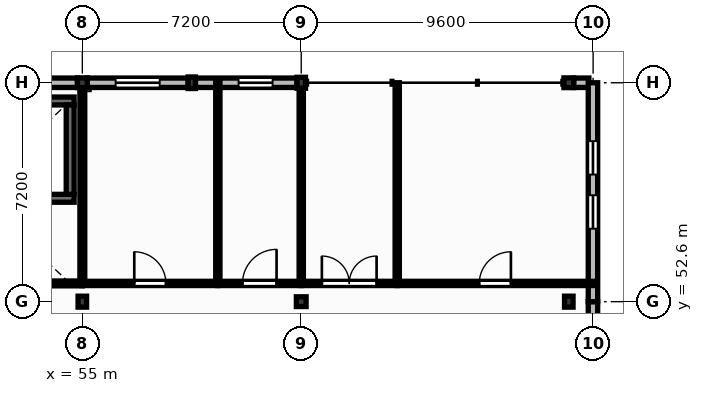
"""IFC4 building model, lengths in metres.
Left out: names, types, materials, properties, quantities, classifications, styles, units other than length and angle.
Written with IfcOpenShell. Run it as: python <this file> out.ifc"""

import sys

from ifc_helpers import new_model, si_unit, direction, frame, frame_2d, origin, origin_2d, place, context, subcontext, project, spatial, rectangle, extrude, element, fill, save


model = new_model("IFC4")
c1 = context("Model", 3, precision=1e-05, world=origin(), true_north=direction((0.0, 1.0)))
c2 = subcontext(c1, "Body", "Model", "MODEL_VIEW")
j1 = project(units=[si_unit("LENGTHUNIT", "METRE"), si_unit("PLANEANGLEUNIT", "RADIAN")], contexts=[c1])
p1 = place(None, origin())
s1 = spatial("IfcSite", under=j1, at=p1, CompositionType="ELEMENT")
p2 = place(p1, origin())
s2 = spatial("IfcBuilding", under=s1, at=p2, CompositionType="ELEMENT")
p3 = place(p2, frame((0.0, 0.0, 9.0)))
s3 = spatial("IfcBuildingStorey", under=s2, at=p3, CompositionType="ELEMENT", Elevation=9.0)
p4 = place(p3, frame((55.0, 52.6, 0.0), z_axis=(0.0, 0.0, 1.0), x_axis=(1.0, 0.0, 0.0)))
e1 = element("IfcColumn", 1, at=p4, inside=s3, PredefinedType="COLUMN", context=c2, shape_type="SweptSolid", body=[
    extrude(rectangle(XDim=0.28, YDim=0.36, at=origin_2d()), origin(), (0.0, 0.0, 1.0), 3.99),
])
p5 = place(p3, frame((55.0, 59.8, 0.0), z_axis=(0.0, 0.0, 1.0), x_axis=(1.0, 0.0, 0.0)))
e2 = element("IfcColumn", 2, at=p5, inside=s3, PredefinedType="COLUMN", context=c2, shape_type="SweptSolid", body=[
    extrude(rectangle(XDim=0.32, YDim=0.32, at=origin_2d()), origin(), (0.0, 0.0, 1.0), 3.99),
])
p6 = place(p3, frame((62.2, 52.6, 0.0), z_axis=(0.0, 0.0, 1.0), x_axis=(1.0, 0.0, 0.0)))
e3 = element("IfcColumn", 3, at=p6, inside=s3, PredefinedType="COLUMN", context=c2, shape_type="SweptSolid", body=[
    extrude(rectangle(XDim=0.32, YDim=0.32, at=origin_2d()), origin(), (0.0, 0.0, 1.0), 3.98),
])
for number, where, z_axis, x_axis in (
    (4, (62.2, 59.8, 0.0), (0.0, 0.0, 1.0), (1.0, 0.0, 0.0)),
    (5, (71.0, 52.6, 0.0), (0.0, 0.0, 1.0), (1.0, 0.0, 0.0)),
):
    element("IfcColumn", number, at=place(p3, frame(where, z_axis=z_axis, x_axis=x_axis)), inside=s3, PredefinedType="COLUMN", context=c2, shape_type="SweptSolid", body=[
        extrude(rectangle(XDim=0.28, YDim=0.36, at=origin_2d()), origin(), (0.0, 0.0, 1.0), 3.98),
    ])
p7 = place(p3, frame((71.0, 59.8, 0.0), z_axis=(0.0, 0.0, 1.0), x_axis=(1.0, 0.0, 0.0)))
e6 = element("IfcColumn", 6, at=p7, inside=s3, PredefinedType="COLUMN", context=c2, shape_type="SweptSolid", body=[
    extrude(rectangle(XDim=0.32, YDim=0.32, at=origin_2d()), origin(), (0.0, 0.0, 1.0), 3.98),
])
p8 = place(p3, frame((58.6, 59.8, 0.0), z_axis=(0.0, 0.0, 1.0), x_axis=(1.0, 0.0, 0.0)))
e7 = element("IfcColumn", 7, at=p8, inside=s3, PredefinedType="PILASTER", context=c2, shape_type="SweptSolid", body=[
    extrude(rectangle(XDim=0.24, YDim=0.38, at=origin_2d()), origin(), (0.0, 0.0, 1.0), 3.99),
])
p9 = place(p3, frame((51.52, 59.8, 0.0), z_axis=(0.0, 0.0, 1.0), x_axis=(1.0, 0.0, 0.0)))
e8 = element("IfcWall", 8, at=p9, inside=s3, PredefinedType="SOLIDWALL", context=c2, shape_type="SweptSolid", body=[
    extrude(rectangle(XDim=3.32, YDim=0.31, at=frame_2d((1.66, 0.0))), origin(), (0.0, 0.0, 1.0), 3.53),
])
p10 = place(p3, frame((55.16, 59.8, 0.0), z_axis=(0.0, 0.0, 1.0), x_axis=(1.0, 0.0, 0.0)))
e9 = element("IfcWall", 9, at=p10, inside=s3, PredefinedType="SOLIDWALL", context=c2, shape_type="SweptSolid", body=[
    extrude(rectangle(XDim=3.32, YDim=0.31, at=frame_2d((1.66, 0.0))), origin(), (0.0, 0.0, 1.0), 3.52),
])
p11 = place(p10, frame((0.935, 0.0, 1.35)))
e10 = element("IfcOpeningElement", 10, at=p11, cuts=e9, PredefinedType="OPENING", context=c2, shape_type="SweptSolid", body=[
    extrude(rectangle(XDim=1.45, YDim=1.4, at=frame_2d((0.725, 0.7))), frame((0.0, 0.165, 0.0), z_axis=(0.0, -1.0, 0.0), x_axis=(1.0, 0.0, 0.0)), (0.0, 0.0, 1.0), 0.33),
])
p12 = place(p3, frame((58.72, 59.8, 0.0), z_axis=(0.0, 0.0, 1.0), x_axis=(1.0, 0.0, 0.0)))
e11 = element("IfcWall", 11, at=p12, inside=s3, PredefinedType="SOLIDWALL", context=c2, shape_type="SweptSolid", body=[
    extrude(rectangle(XDim=3.34, YDim=0.31, at=frame_2d((1.67, 0.0))), origin(), (0.0, 0.0, 1.0), 3.52),
])
p13 = place(p12, frame((1.418, 0.0, 1.05)))
e12 = element("IfcOpeningElement", 12, at=p13, cuts=e11, PredefinedType="OPENING", context=c2, shape_type="SweptSolid", body=[
    extrude(rectangle(XDim=1.12, YDim=1.65, at=frame_2d((0.56, 0.825))), frame((0.0, 0.165, 0.0), z_axis=(0.0, -1.0, 0.0), x_axis=(1.0, 0.0, 0.0)), (0.0, 0.0, 1.0), 0.33),
])
p14 = place(p3, frame((71.795, 45.4, 0.0), z_axis=(0.0, 0.0, 1.0), x_axis=(0.0, 1.0, 0.0)))
e13 = element("IfcWall", 13, at=p14, inside=s3, PredefinedType="SOLIDWALL", context=c2, shape_type="SweptSolid", body=[
    extrude(rectangle(XDim=7.2, YDim=0.31, at=frame_2d((3.6, 0.0))), origin(), (0.0, 0.0, 1.0), 3.98),
])
p15 = place(p14, frame((0.94, 0.0, 1.0)))
e14 = element("IfcOpeningElement", 14, at=p15, cuts=e13, PredefinedType="OPENING", context=c2, shape_type="SweptSolid", body=[
    extrude(rectangle(XDim=1.38, YDim=1.8, at=frame_2d((0.69, 0.9))), frame((0.0, 0.165, 0.0), z_axis=(0.0, -1.0, 0.0), x_axis=(1.0, 0.0, 0.0)), (0.0, 0.0, 1.0), 0.33),
])
p16 = place(p14, frame((3.0, 0.0, 1.0)))
e15 = element("IfcOpeningElement", 15, at=p16, cuts=e13, PredefinedType="OPENING", context=c2, shape_type="SweptSolid", body=[
    extrude(rectangle(XDim=1.38, YDim=1.8, at=frame_2d((0.69, 0.9))), frame((0.0, 0.165, 0.0), z_axis=(0.0, -1.0, 0.0), x_axis=(1.0, 0.0, 0.0)), (0.0, 0.0, 1.0), 0.33),
])
p17 = place(p3, frame((71.16, 59.8, 0.0), z_axis=(0.0, 0.0, 1.0), x_axis=(1.0, 0.0, 0.0)))
e16 = element("IfcWall", 16, at=p17, inside=s3, PredefinedType="SOLIDWALL", context=c2, shape_type="SweptSolid", body=[
    extrude(rectangle(XDim=0.5, YDim=0.31, at=frame_2d((0.25, 0.0))), origin(), (0.0, 0.0, 1.0), 3.98),
])
p18 = place(p3, frame((71.795, 52.6, 0.0), z_axis=(0.0, 0.0, 1.0), x_axis=(0.0, 1.0, 0.0)))
e17 = element("IfcWall", 17, at=p18, inside=s3, PredefinedType="SOLIDWALL", context=c2, shape_type="SweptSolid", body=[
    extrude(rectangle(XDim=7.2, YDim=0.31, at=frame_2d((3.6, 0.0))), origin(), (0.0, 0.0, 1.0), 3.98),
])
p19 = place(p18, frame((2.4, 0.0, 1.0)))
e18 = element("IfcOpeningElement", 18, at=p19, cuts=e17, PredefinedType="OPENING", context=c2, shape_type="SweptSolid", body=[
    extrude(rectangle(XDim=1.1, YDim=2.2, at=frame_2d((0.55, 1.1))), frame((0.0, 0.165, 0.0), z_axis=(0.0, -1.0, 0.0), x_axis=(1.0, 0.0, 0.0)), (0.0, 0.0, 1.0), 0.33),
])
p20 = place(p18, frame((4.18, 0.0, 1.0)))
e19 = element("IfcOpeningElement", 19, at=p20, cuts=e17, PredefinedType="OPENING", context=c2, shape_type="SweptSolid", body=[
    extrude(rectangle(XDim=1.1, YDim=2.2, at=frame_2d((0.55, 1.1))), frame((0.0, 0.165, 0.0), z_axis=(0.0, -1.0, 0.0), x_axis=(1.0, 0.0, 0.0)), (0.0, 0.0, 1.0), 0.33),
])
for number, where, z_axis, x_axis in (
    (20, (48.07, 56.0, 0.0), (0.0, 0.0, 1.0), (1.0, 0.0, 0.0)),
    (21, (48.07, 59.2, 0.0), (0.0, 0.0, 1.0), (1.0, 0.0, 0.0)),
):
    element("IfcWall", number, at=place(p3, frame(where, z_axis=z_axis, x_axis=x_axis)), inside=s3, PredefinedType="SHEAR", context=c2, shape_type="SweptSolid", body=[
        extrude(rectangle(XDim=6.66, YDim=0.26, at=frame_2d((3.33, 0.0))), origin(), (0.0, 0.0, 1.0), 3.95),
    ])
p21 = place(p3, frame((54.6, 56.13, 0.0), z_axis=(0.0, 0.0, 1.0), x_axis=(0.0, 1.0, 0.0)))
e22 = element("IfcWall", 22, at=p21, inside=s3, PredefinedType="SHEAR", context=c2, shape_type="SweptSolid", body=[
    extrude(rectangle(XDim=2.94, YDim=0.26, at=frame_2d((1.47, 0.0))), origin(), (0.0, 0.0, 1.0), 3.95),
])
p22 = place(p3, frame((55.0, 53.2, 0.0), z_axis=(0.0, 0.0, 1.0), x_axis=(1.0, 0.0, 0.0)))
e23 = element("IfcWall", 23, at=p22, inside=s3, PredefinedType="PARTITIONING", context=c2, shape_type="SweptSolid", body=[
    extrude(rectangle(XDim=4.457, YDim=0.14, at=frame_2d((2.229, 0.0))), origin(), (0.0, 0.0, 1.0), 3.96),
])
p23 = place(p22, frame((1.708, 0.0, 0.0)))
e24 = element("IfcOpeningElement", 24, at=p23, cuts=e23, PredefinedType="OPENING", context=c2, shape_type="SweptSolid", body=[
    extrude(rectangle(XDim=1.04, YDim=2.1, at=frame_2d((0.52, 1.05))), frame((0.0, 0.08, 0.0), z_axis=(0.0, -1.0, 0.0), x_axis=(1.0, 0.0, 0.0)), (0.0, 0.0, 1.0), 0.16),
])
p24 = place(p3, frame((59.457, 53.27, 0.0), z_axis=(0.0, 0.0, 1.0), x_axis=(0.0, 1.0, 0.0)))
e25 = element("IfcWall", 25, at=p24, inside=s3, PredefinedType="PARTITIONING", context=c2, shape_type="SweptSolid", body=[
    extrude(rectangle(XDim=6.53, YDim=0.14, at=frame_2d((3.265, 0.0))), origin(), (0.0, 0.0, 1.0), 3.96),
])
p25 = place(p3, frame((59.457, 53.2, 0.0), z_axis=(0.0, 0.0, 1.0), x_axis=(1.0, 0.0, 0.0)))
e26 = element("IfcWall", 26, at=p25, inside=s3, PredefinedType="PARTITIONING", context=c2, shape_type="SweptSolid", body=[
    extrude(rectangle(XDim=2.743, YDim=0.14, at=frame_2d((1.372, 0.0))), origin(), (0.0, 0.0, 1.0), 3.96),
])
p26 = place(p25, frame((0.812, 0.0, 0.0)))
e27 = element("IfcOpeningElement", 27, at=p26, cuts=e26, PredefinedType="OPENING", context=c2, shape_type="SweptSolid", body=[
    extrude(rectangle(XDim=1.12, YDim=2.15, at=frame_2d((0.56, 1.075))), frame((0.0, 0.08, 0.0), z_axis=(0.0, -1.0, 0.0), x_axis=(1.0, 0.0, 0.0)), (0.0, 0.0, 1.0), 0.16),
])
p27 = place(p3, frame((62.2, 53.27, 0.0), z_axis=(0.0, 0.0, 1.0), x_axis=(0.0, 1.0, 0.0)))
e28 = element("IfcWall", 28, at=p27, inside=s3, PredefinedType="PARTITIONING", context=c2, shape_type="SweptSolid", body=[
    extrude(rectangle(XDim=6.35, YDim=0.14, at=frame_2d((3.175, 0.0))), origin(), (0.0, 0.0, 1.0), 3.52),
])
p28 = place(p3, frame((62.2, 53.2, 0.0), z_axis=(0.0, 0.0, 1.0), x_axis=(1.0, 0.0, 0.0)))
e29 = element("IfcWall", 29, at=p28, inside=s3, PredefinedType="PARTITIONING", context=c2, shape_type="SweptSolid", body=[
    extrude(rectangle(XDim=3.157, YDim=0.14, at=frame_2d((1.579, 0.0))), origin(), (0.0, 0.0, 1.0), 3.96),
])
p29 = place(p28, frame((0.678, 0.0, 0.0)))
e30 = element("IfcOpeningElement", 30, at=p29, cuts=e29, PredefinedType="OPENING", context=c2, shape_type="SweptSolid", body=[
    extrude(rectangle(XDim=1.8, YDim=2.3, at=frame_2d((0.9, 1.15))), frame((0.0, 0.08, 0.0), z_axis=(0.0, -1.0, 0.0), x_axis=(1.0, 0.0, 0.0)), (0.0, 0.0, 1.0), 0.16),
])
p30 = place(p3, frame((65.357, 53.27, 0.0), z_axis=(0.0, 0.0, 1.0), x_axis=(0.0, 1.0, 0.0)))
e31 = element("IfcWall", 31, at=p30, inside=s3, PredefinedType="PARTITIONING", context=c2, shape_type="SweptSolid", body=[
    extrude(rectangle(XDim=6.53, YDim=0.14, at=frame_2d((3.265, 0.0))), origin(), (0.0, 0.0, 1.0), 3.96),
])
p31 = place(p3, frame((65.357, 53.2, 0.0), z_axis=(0.0, 0.0, 1.0), x_axis=(1.0, 0.0, 0.0)))
e32 = element("IfcWall", 32, at=p31, inside=s3, PredefinedType="PARTITIONING", context=c2, shape_type="SweptSolid", body=[
    extrude(rectangle(XDim=6.438, YDim=0.14, at=frame_2d((3.219, 0.0))), origin(), (0.0, 0.0, 1.0), 3.96),
])
p32 = place(p31, frame((2.699, 0.0, 0.0)))
e33 = element("IfcOpeningElement", 33, at=p32, cuts=e32, PredefinedType="OPENING", context=c2, shape_type="SweptSolid", body=[
    extrude(rectangle(XDim=1.04, YDim=2.1, at=frame_2d((0.52, 1.05))), frame((0.0, 0.08, 0.0), z_axis=(0.0, -1.0, 0.0), x_axis=(1.0, 0.0, 0.0)), (0.0, 0.0, 1.0), 0.16),
])
p33 = place(p3, frame((55.0, 53.2, 0.0), z_axis=(0.0, 0.0, 1.0), x_axis=(-1.0, 0.0, 0.0)))
e34 = element("IfcWall", 34, at=p33, inside=s3, PredefinedType="PARTITIONING", context=c2, shape_type="SweptSolid", body=[
    extrude(rectangle(XDim=2.8, YDim=0.16, at=frame_2d((1.4, 0.0))), origin(), (0.0, 0.0, 1.0), 3.96),
])
p34 = place(p3, frame((55.0, 53.27, 0.0), z_axis=(0.0, 0.0, 1.0), x_axis=(0.0, 1.0, 0.0)))
e35 = element("IfcWall", 35, at=p34, inside=s3, PredefinedType="PARTITIONING", context=c2, shape_type="SweptSolid", body=[
    extrude(rectangle(XDim=6.37, YDim=0.16, at=frame_2d((3.185, 0.0))), origin(), (0.0, 0.0, 1.0), 3.47),
])
p35 = place(p11, origin())
e36 = element("IfcWindow", 36, at=p35, inside=s3, PartitioningType="SINGLE_PANEL", PredefinedType="WINDOW", context=c2, shape_type="SweptSolid", body=[
    extrude(rectangle(XDim=1.45, YDim=1.4, at=frame_2d((0.725, 0.7))), frame((0.0, 0.03, 0.0), z_axis=(0.0, -1.0, 0.0), x_axis=(1.0, 0.0, 0.0)), (0.0, 0.0, 1.0), 0.06),
])
fill(e10, e36)
p36 = place(p13, origin())
e37 = element("IfcWindow", 37, at=p36, inside=s3, PartitioningType="SINGLE_PANEL", PredefinedType="WINDOW", context=c2, shape_type="SweptSolid", body=[
    extrude(rectangle(XDim=1.12, YDim=1.65, at=frame_2d((0.56, 0.825))), frame((0.0, 0.03, 0.0), z_axis=(0.0, -1.0, 0.0), x_axis=(1.0, 0.0, 0.0)), (0.0, 0.0, 1.0), 0.06),
])
fill(e12, e37)
p37 = place(p19, origin())
e38 = element("IfcWindow", 38, at=p37, inside=s3, PartitioningType="SINGLE_PANEL", PredefinedType="WINDOW", context=c2, shape_type="SweptSolid", body=[
    extrude(rectangle(XDim=1.1, YDim=2.2, at=frame_2d((0.55, 1.1))), frame((0.0, 0.03, 0.0), z_axis=(0.0, -1.0, 0.0), x_axis=(1.0, 0.0, 0.0)), (0.0, 0.0, 1.0), 0.06),
])
fill(e18, e38)
p38 = place(p20, origin())
e39 = element("IfcWindow", 39, at=p38, inside=s3, PartitioningType="SINGLE_PANEL", PredefinedType="WINDOW", context=c2, shape_type="SweptSolid", body=[
    extrude(rectangle(XDim=1.1, YDim=2.2, at=frame_2d((0.55, 1.1))), frame((0.0, 0.03, 0.0), z_axis=(0.0, -1.0, 0.0), x_axis=(1.0, 0.0, 0.0)), (0.0, 0.0, 1.0), 0.06),
])
fill(e19, e39)
p39 = place(p23, origin())
e40 = element("IfcDoor", 40, at=p39, inside=s3, OperationType="SINGLE_SWING_LEFT", PredefinedType="DOOR", context=c2, shape_type="SweptSolid", body=[
    extrude(rectangle(XDim=1.04, YDim=2.1, at=frame_2d((0.52, 1.05))), frame((0.0, 0.025, 0.0), z_axis=(0.0, -1.0, 0.0), x_axis=(1.0, 0.0, 0.0)), (0.0, 0.0, 1.0), 0.05),
])
fill(e24, e40)
p40 = place(p26, origin())
e41 = element("IfcDoor", 41, at=p40, inside=s3, OperationType="SINGLE_SWING_RIGHT", PredefinedType="DOOR", context=c2, shape_type="SweptSolid", body=[
    extrude(rectangle(XDim=1.12, YDim=2.15, at=frame_2d((0.56, 1.075))), frame((0.0, 0.025, 0.0), z_axis=(0.0, -1.0, 0.0), x_axis=(1.0, 0.0, 0.0)), (0.0, 0.0, 1.0), 0.05),
])
fill(e27, e41)
p41 = place(p29, origin())
e42 = element("IfcDoor", 42, at=p41, inside=s3, OperationType="DOUBLE_DOOR_SINGLE_SWING", PredefinedType="DOOR", context=c2, shape_type="SweptSolid", body=[
    extrude(rectangle(XDim=1.8, YDim=2.3, at=frame_2d((0.9, 1.15))), frame((0.0, 0.025, 0.0), z_axis=(0.0, -1.0, 0.0), x_axis=(1.0, 0.0, 0.0)), (0.0, 0.0, 1.0), 0.05),
])
fill(e30, e42)
p42 = place(p32, origin())
e43 = element("IfcDoor", 43, at=p42, inside=s3, OperationType="SINGLE_SWING_RIGHT", PredefinedType="DOOR", context=c2, shape_type="SweptSolid", body=[
    extrude(rectangle(XDim=1.04, YDim=2.1, at=frame_2d((0.52, 1.05))), frame((0.0, 0.025, 0.0), z_axis=(0.0, -1.0, 0.0), x_axis=(1.0, 0.0, 0.0)), (0.0, 0.0, 1.0), 0.05),
])
fill(e33, e43)
save(model, sys.argv[1])
